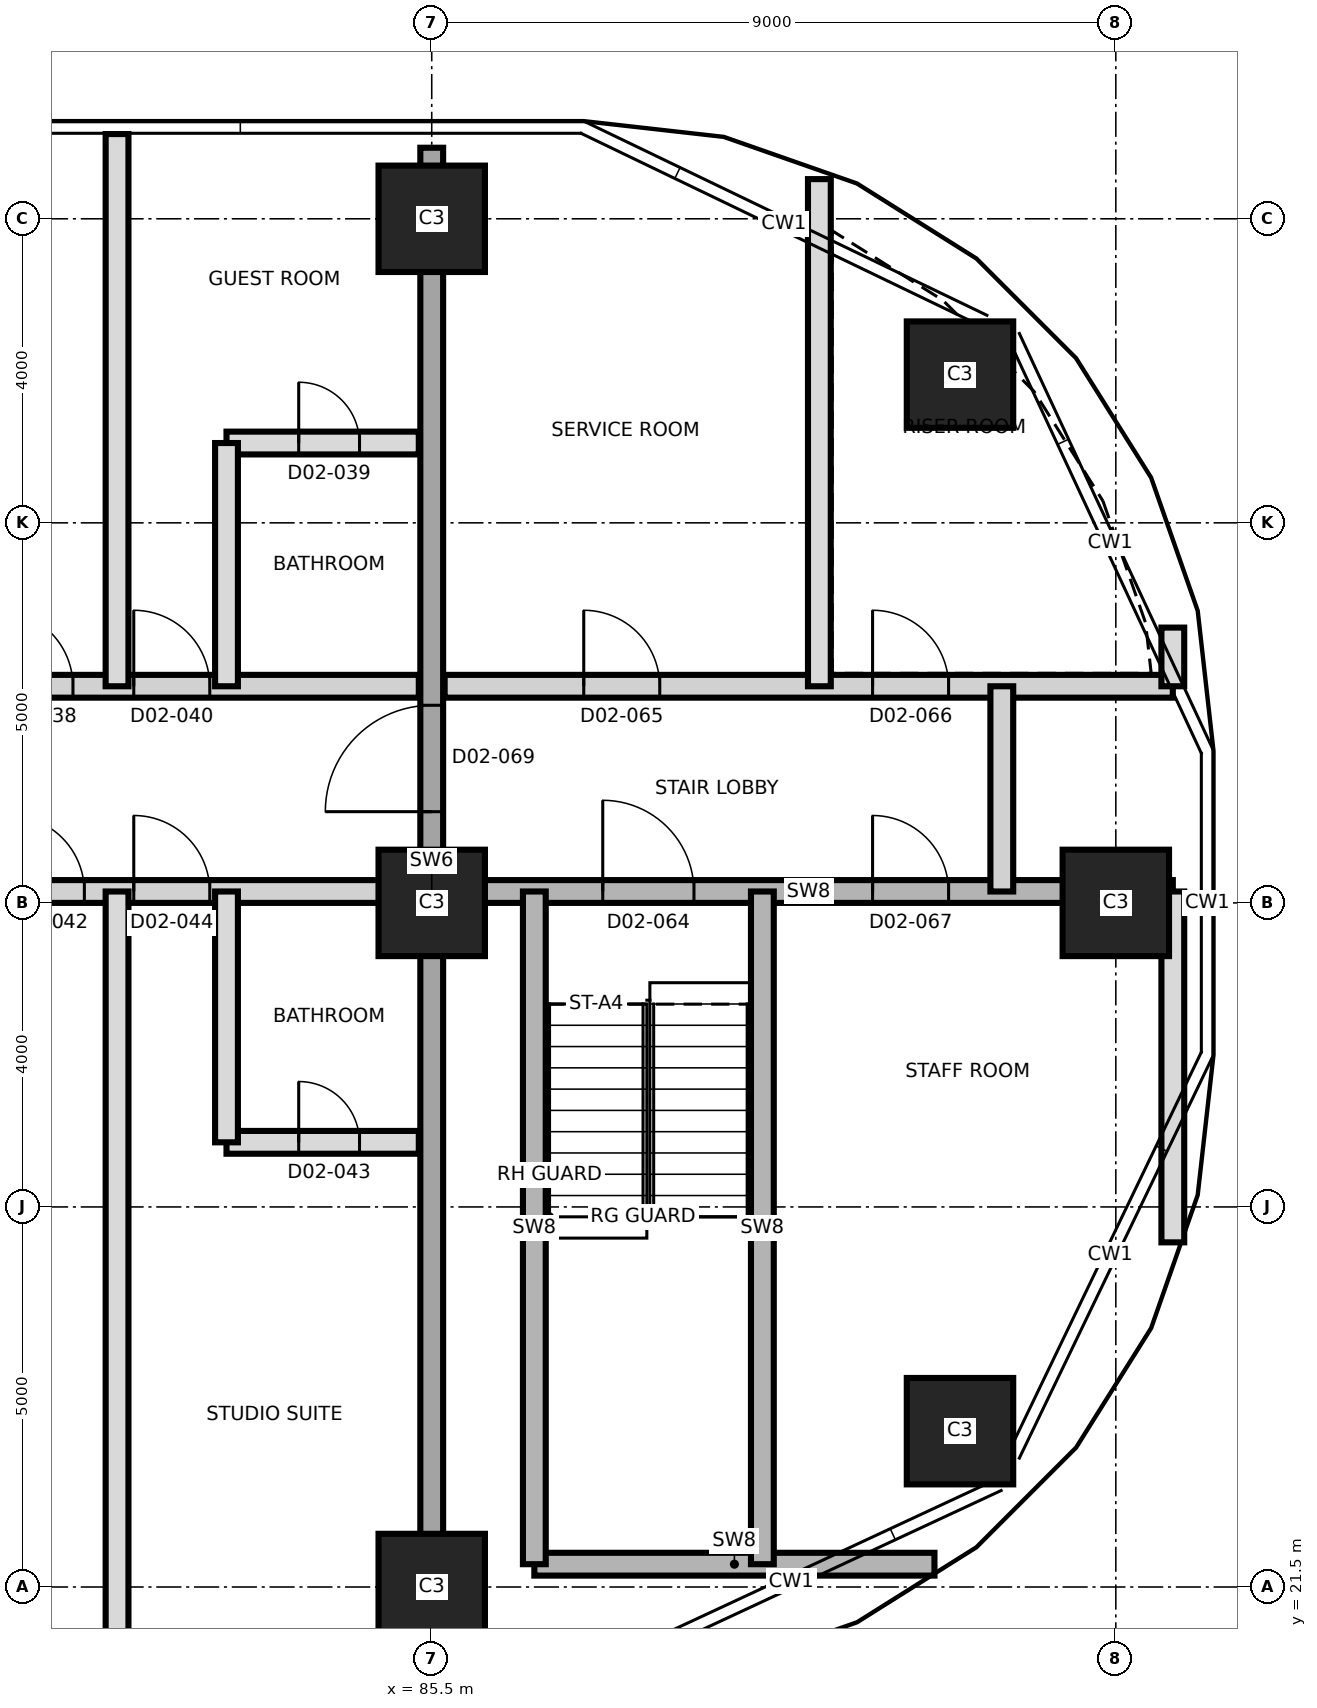
"""IFC4 building model, lengths in metres.
Left out: names, types, materials, properties, quantities, classifications, styles, units other than length and angle.
Written with IfcOpenShell. Run it as: python <this file> out.ifc"""

import sys

from ifc_helpers import new_model, si_unit, direction, frame, frame_2d, origin, origin_2d, place, context, subcontext, project, spatial, rectangle, extrude, element, fill, save


model = new_model("IFC4")
c1 = context("Model", 3, precision=1e-05, world=origin(), true_north=direction((0.0, 1.0)))
c2 = subcontext(c1, "Body", "Model", "MODEL_VIEW")
j1 = project(units=[si_unit("LENGTHUNIT", "METRE"), si_unit("PLANEANGLEUNIT", "RADIAN")], contexts=[c1])
p1 = place(None, origin())
s1 = spatial("IfcSite", under=j1, at=p1, CompositionType="ELEMENT")
p2 = place(p1, origin())
s2 = spatial("IfcBuilding", under=s1, at=p2, CompositionType="ELEMENT")
p3 = place(p2, frame((0.0, 0.0, 48.3)))
s3 = spatial("IfcBuildingStorey", under=s2, at=p3, CompositionType="ELEMENT", Elevation=48.3)
for number, where, z_axis, x_axis in (
    (1, (85.5, 21.5, 0.0), (0.0, 0.0, 1.0), (1.0, 0.0, 0.0)),
    (2, (92.45, 23.55, 0.0), (0.0, 0.0, 1.0), (1.0, 0.0, 0.0)),
    (3, (85.5, 30.5, 0.0), (0.0, 0.0, 1.0), (1.0, 0.0, 0.0)),
    (4, (94.5, 30.5, 0.0), (0.0, 0.0, 1.0), (1.0, 0.0, 0.0)),
    (5, (92.45, 37.45, 0.0), (0.0, 0.0, 1.0), (1.0, 0.0, 0.0)),
    (6, (85.5, 39.5, 0.0), (0.0, 0.0, 1.0), (1.0, 0.0, 0.0)),
):
    element("IfcColumn", number, at=place(p3, frame(where, z_axis=z_axis, x_axis=x_axis)), inside=s3, PredefinedType="COLUMN", context=c2, shape_type="SweptSolid", body=[
        extrude(rectangle(XDim=1.4, YDim=1.4, at=origin_2d()), origin(), (0.0, 0.0, 1.0), 3.7),
    ])
p4 = place(p3, frame((85.5, 20.565, 0.0), z_axis=(0.0, 0.0, 1.0), x_axis=(0.0, 1.0, 0.0)))
e7 = element("IfcWall", 7, at=p4, inside=s3, PredefinedType="SHEAR", context=c2, shape_type="SweptSolid", body=[
    extrude(rectangle(XDim=19.87, YDim=0.3, at=frame_2d((9.935, 0.0))), origin(), (0.0, 0.0, 1.0), 3.7),
])
p5 = place(p4, frame((11.135, 0.0, 0.0)))
e8 = element("IfcOpeningElement", 8, at=p5, cuts=e7, PredefinedType="OPENING", context=c2, shape_type="SweptSolid", body=[
    extrude(rectangle(XDim=1.4, YDim=2.1, at=frame_2d((0.7, 1.05))), frame((0.0, 0.16, 0.0), z_axis=(0.0, -1.0, 0.0), x_axis=(1.0, 0.0, 0.0)), (0.0, 0.0, 1.0), 0.32),
])
p6 = place(p3, frame((86.85, 21.8, 0.0), z_axis=(0.0, 0.0, 1.0), x_axis=(1.0, 0.0, 0.0)))
e9 = element("IfcWall", 9, at=p6, inside=s3, PredefinedType="SHEAR", context=c2, shape_type="SweptSolid", body=[
    extrude(rectangle(XDim=5.264, YDim=0.3, at=frame_2d((2.632, 0.0))), origin(), (0.0, 0.0, 1.0), 3.4),
])
p7 = place(p3, frame((82.8, 27.35, 0.0), z_axis=(0.0, 0.0, 1.0), x_axis=(1.0, 0.0, 0.0)))
e10 = element("IfcWall", 10, at=p7, inside=s3, PredefinedType="PARTITIONING", context=c2, shape_type="SweptSolid", body=[
    extrude(rectangle(XDim=2.53, YDim=0.3, at=frame_2d((1.265, 0.0))), origin(), (0.0, 0.0, 1.0), 3.4),
])
p8 = place(p7, frame((0.95, 0.0, 0.0)))
e11 = element("IfcOpeningElement", 11, at=p8, cuts=e10, PredefinedType="OPENING", context=c2, shape_type="SweptSolid", body=[
    extrude(rectangle(XDim=0.8, YDim=2.1, at=frame_2d((0.4, 1.05))), frame((0.0, 0.16, 0.0), z_axis=(0.0, -1.0, 0.0), x_axis=(1.0, 0.0, 0.0)), (0.0, 0.0, 1.0), 0.32),
])
p9 = place(p3, frame((58.95, 30.65, 0.0), z_axis=(0.0, 0.0, 1.0), x_axis=(1.0, 0.0, 0.0)))
e12 = element("IfcWall", 12, at=p9, inside=s3, PredefinedType="PARTITIONING", context=c2, shape_type="SweptSolid", body=[
    extrude(rectangle(XDim=26.38, YDim=0.3, at=frame_2d((13.19, 0.0))), origin(), (0.0, 0.0, 1.0), 3.4),
])
p10 = place(p9, frame((0.685, 0.0, 0.0)))
e13 = element("IfcOpeningElement", 13, at=p10, cuts=e12, PredefinedType="OPENING", context=c2, shape_type="SweptSolid", body=[
    extrude(rectangle(XDim=1.2, YDim=2.1, at=frame_2d((0.6, 1.05))), frame((0.0, 0.16, 0.0), z_axis=(0.0, -1.0, 0.0), x_axis=(1.0, 0.0, 0.0)), (0.0, 0.0, 1.0), 0.32),
])
p11 = place(p9, frame((3.935, 0.0, 0.0)))
e14 = element("IfcOpeningElement", 14, at=p11, cuts=e12, PredefinedType="OPENING", context=c2, shape_type="SweptSolid", body=[
    extrude(rectangle(XDim=1.0, YDim=2.1, at=frame_2d((0.5, 1.05))), frame((0.0, 0.16, 0.0), z_axis=(0.0, -1.0, 0.0), x_axis=(1.0, 0.0, 0.0)), (0.0, 0.0, 1.0), 0.32),
])
p12 = place(p9, frame((12.55, 0.0, 0.0)))
e15 = element("IfcOpeningElement", 15, at=p12, cuts=e12, PredefinedType="OPENING", context=c2, shape_type="SweptSolid", body=[
    extrude(rectangle(XDim=1.0, YDim=2.4, at=frame_2d((0.5, 1.2))), frame((0.0, 0.16, 0.0), z_axis=(0.0, -1.0, 0.0), x_axis=(1.0, 0.0, 0.0)), (0.0, 0.0, 1.0), 0.32),
])
p13 = place(p9, frame((20.98, 0.0, 0.0)))
e16 = element("IfcOpeningElement", 16, at=p13, cuts=e12, PredefinedType="OPENING", context=c2, shape_type="SweptSolid", body=[
    extrude(rectangle(XDim=1.0, YDim=2.4, at=frame_2d((0.5, 1.2))), frame((0.0, 0.16, 0.0), z_axis=(0.0, -1.0, 0.0), x_axis=(1.0, 0.0, 0.0)), (0.0, 0.0, 1.0), 0.32),
])
p14 = place(p9, frame((22.63, 0.0, 0.0)))
e17 = element("IfcOpeningElement", 17, at=p14, cuts=e12, PredefinedType="OPENING", context=c2, shape_type="SweptSolid", body=[
    extrude(rectangle(XDim=1.0, YDim=2.4, at=frame_2d((0.5, 1.2))), frame((0.0, 0.16, 0.0), z_axis=(0.0, -1.0, 0.0), x_axis=(1.0, 0.0, 0.0)), (0.0, 0.0, 1.0), 0.32),
])
p15 = place(p3, frame((85.67, 30.65, 0.0), z_axis=(0.0, 0.0, 1.0), x_axis=(1.0, 0.0, 0.0)))
e18 = element("IfcWall", 18, at=p15, inside=s3, PredefinedType="SHEAR", context=c2, shape_type="SweptSolid", body=[
    extrude(rectangle(XDim=9.58, YDim=0.3, at=frame_2d((4.79, 0.0))), origin(), (0.0, 0.0, 1.0), 3.4),
])
p16 = place(p15, frame((2.08, 0.0, 0.0)))
e19 = element("IfcOpeningElement", 19, at=p16, cuts=e18, PredefinedType="OPENING", context=c2, shape_type="SweptSolid", body=[
    extrude(rectangle(XDim=1.2, YDim=2.1, at=frame_2d((0.6, 1.05))), frame((0.0, 0.16, 0.0), z_axis=(0.0, -1.0, 0.0), x_axis=(1.0, 0.0, 0.0)), (0.0, 0.0, 1.0), 0.32),
])
p17 = place(p15, frame((5.63, 0.0, 0.0)))
e20 = element("IfcOpeningElement", 20, at=p17, cuts=e18, PredefinedType="OPENING", context=c2, shape_type="SweptSolid", body=[
    extrude(rectangle(XDim=1.0, YDim=2.1, at=frame_2d((0.5, 1.05))), frame((0.0, 0.16, 0.0), z_axis=(0.0, -1.0, 0.0), x_axis=(1.0, 0.0, 0.0)), (0.0, 0.0, 1.0), 0.32),
])
p18 = place(p3, frame((58.95, 33.35, 0.0), z_axis=(0.0, 0.0, 1.0), x_axis=(1.0, 0.0, 0.0)))
e21 = element("IfcWall", 21, at=p18, inside=s3, PredefinedType="PARTITIONING", context=c2, shape_type="SweptSolid", body=[
    extrude(rectangle(XDim=26.38, YDim=0.3, at=frame_2d((13.19, 0.0))), origin(), (0.0, 0.0, 1.0), 3.4),
])
p19 = place(p18, frame((2.6, 0.0, 0.0)))
e22 = element("IfcOpeningElement", 22, at=p19, cuts=e21, PredefinedType="OPENING", context=c2, shape_type="SweptSolid", body=[
    extrude(rectangle(XDim=1.0, YDim=2.1, at=frame_2d((0.5, 1.05))), frame((0.0, 0.16, 0.0), z_axis=(0.0, -1.0, 0.0), x_axis=(1.0, 0.0, 0.0)), (0.0, 0.0, 1.0), 0.32),
])
p20 = place(p18, frame((5.55, 0.0, 0.0)))
e23 = element("IfcOpeningElement", 23, at=p20, cuts=e21, PredefinedType="OPENING", context=c2, shape_type="SweptSolid", body=[
    extrude(rectangle(XDim=1.4, YDim=2.1, at=frame_2d((0.7, 1.05))), frame((0.0, 0.16, 0.0), z_axis=(0.0, -1.0, 0.0), x_axis=(1.0, 0.0, 0.0)), (0.0, 0.0, 1.0), 0.32),
])
p21 = place(p18, frame((14.2, 0.0, 0.0)))
e24 = element("IfcOpeningElement", 24, at=p21, cuts=e21, PredefinedType="OPENING", context=c2, shape_type="SweptSolid", body=[
    extrude(rectangle(XDim=1.0, YDim=2.4, at=frame_2d((0.5, 1.2))), frame((0.0, 0.16, 0.0), z_axis=(0.0, -1.0, 0.0), x_axis=(1.0, 0.0, 0.0)), (0.0, 0.0, 1.0), 0.32),
])
p22 = place(p18, frame((20.83, 0.0, 0.0)))
e25 = element("IfcOpeningElement", 25, at=p22, cuts=e21, PredefinedType="OPENING", context=c2, shape_type="SweptSolid", body=[
    extrude(rectangle(XDim=1.0, YDim=2.1, at=frame_2d((0.5, 1.05))), frame((0.0, 0.16, 0.0), z_axis=(0.0, -1.0, 0.0), x_axis=(1.0, 0.0, 0.0)), (0.0, 0.0, 1.0), 0.32),
])
p23 = place(p18, frame((22.63, 0.0, 0.0)))
e26 = element("IfcOpeningElement", 26, at=p23, cuts=e21, PredefinedType="OPENING", context=c2, shape_type="SweptSolid", body=[
    extrude(rectangle(XDim=1.0, YDim=2.1, at=frame_2d((0.5, 1.05))), frame((0.0, 0.16, 0.0), z_axis=(0.0, -1.0, 0.0), x_axis=(1.0, 0.0, 0.0)), (0.0, 0.0, 1.0), 0.32),
])
p24 = place(p3, frame((85.67, 33.35, 0.0), z_axis=(0.0, 0.0, 1.0), x_axis=(1.0, 0.0, 0.0)))
e27 = element("IfcWall", 27, at=p24, inside=s3, PredefinedType="PARTITIONING", context=c2, shape_type="SweptSolid", body=[
    extrude(rectangle(XDim=9.58, YDim=0.3, at=frame_2d((4.79, 0.0))), origin(), (0.0, 0.0, 1.0), 3.4),
])
p25 = place(p24, frame((1.83, 0.0, 0.0)))
e28 = element("IfcOpeningElement", 28, at=p25, cuts=e27, PredefinedType="OPENING", context=c2, shape_type="SweptSolid", body=[
    extrude(rectangle(XDim=1.0, YDim=2.1, at=frame_2d((0.5, 1.05))), frame((0.0, 0.16, 0.0), z_axis=(0.0, -1.0, 0.0), x_axis=(1.0, 0.0, 0.0)), (0.0, 0.0, 1.0), 0.32),
])
p26 = place(p24, frame((5.63, 0.0, 0.0)))
e29 = element("IfcOpeningElement", 29, at=p26, cuts=e27, PredefinedType="OPENING", context=c2, shape_type="SweptSolid", body=[
    extrude(rectangle(XDim=1.0, YDim=2.1, at=frame_2d((0.5, 1.05))), frame((0.0, 0.16, 0.0), z_axis=(0.0, -1.0, 0.0), x_axis=(1.0, 0.0, 0.0)), (0.0, 0.0, 1.0), 0.32),
])
p27 = place(p3, frame((82.8, 36.55, 0.0), z_axis=(0.0, 0.0, 1.0), x_axis=(1.0, 0.0, 0.0)))
e30 = element("IfcWall", 30, at=p27, inside=s3, PredefinedType="PARTITIONING", context=c2, shape_type="SweptSolid", body=[
    extrude(rectangle(XDim=2.53, YDim=0.3, at=frame_2d((1.265, 0.0))), origin(), (0.0, 0.0, 1.0), 3.4),
])
p28 = place(p27, frame((0.95, 0.0, 0.0)))
e31 = element("IfcOpeningElement", 31, at=p28, cuts=e30, PredefinedType="OPENING", context=c2, shape_type="SweptSolid", body=[
    extrude(rectangle(XDim=0.8, YDim=2.1, at=frame_2d((0.4, 1.05))), frame((0.0, 0.16, 0.0), z_axis=(0.0, -1.0, 0.0), x_axis=(1.0, 0.0, 0.0)), (0.0, 0.0, 1.0), 0.32),
])
p29 = place(p3, frame((81.36, 20.565, 0.0), z_axis=(0.0, 0.0, 1.0), x_axis=(0.0, 1.0, 0.0)))
e32 = element("IfcWall", 32, at=p29, inside=s3, PredefinedType="PARTITIONING", context=c2, shape_type="SweptSolid", body=[
    extrude(rectangle(XDim=10.085, YDim=0.3, at=frame_2d((5.042, 0.0))), origin(), (0.0, 0.0, 1.0), 3.4),
])
p30 = place(p3, frame((81.36, 33.35, 0.0), z_axis=(0.0, 0.0, 1.0), x_axis=(0.0, 1.0, 0.0)))
e33 = element("IfcWall", 33, at=p30, inside=s3, PredefinedType="PARTITIONING", context=c2, shape_type="SweptSolid", body=[
    extrude(rectangle(XDim=7.265, YDim=0.3, at=frame_2d((3.632, 0.0))), origin(), (0.0, 0.0, 1.0), 3.4),
])
p31 = place(p3, frame((82.8, 27.35, 0.0), z_axis=(0.0, 0.0, 1.0), x_axis=(0.0, 1.0, 0.0)))
e34 = element("IfcWall", 34, at=p31, inside=s3, PredefinedType="PARTITIONING", context=c2, shape_type="SweptSolid", body=[
    extrude(rectangle(XDim=3.3, YDim=0.3, at=frame_2d((1.65, 0.0))), origin(), (0.0, 0.0, 1.0), 3.4),
])
p32 = place(p3, frame((82.8, 33.35, 0.0), z_axis=(0.0, 0.0, 1.0), x_axis=(0.0, 1.0, 0.0)))
e35 = element("IfcWall", 35, at=p32, inside=s3, PredefinedType="PARTITIONING", context=c2, shape_type="SweptSolid", body=[
    extrude(rectangle(XDim=3.2, YDim=0.3, at=frame_2d((1.6, 0.0))), origin(), (0.0, 0.0, 1.0), 3.4),
])
for number, where, z_axis, x_axis in (
    (36, (86.85, 21.8, 0.0), (0.0, 0.0, 1.0), (0.0, 1.0, 0.0)),
    (37, (89.85, 21.8, 0.0), (0.0, 0.0, 1.0), (0.0, 1.0, 0.0)),
):
    element("IfcWall", number, at=place(p3, frame(where, z_axis=z_axis, x_axis=x_axis)), inside=s3, PredefinedType="SHEAR", context=c2, shape_type="SweptSolid", body=[
        extrude(rectangle(XDim=8.85, YDim=0.3, at=frame_2d((4.425, 0.0))), origin(), (0.0, 0.0, 1.0), 3.4),
    ])
p33 = place(p3, frame((90.6, 33.35, 0.0), z_axis=(0.0, 0.0, 1.0), x_axis=(0.0, 1.0, 0.0)))
e38 = element("IfcWall", 38, at=p33, inside=s3, PredefinedType="PARTITIONING", context=c2, shape_type="SweptSolid", body=[
    extrude(rectangle(XDim=6.672, YDim=0.3, at=frame_2d((3.336, 0.0))), origin(), (0.0, 0.0, 1.0), 3.4),
])
p34 = place(p3, frame((93.0, 30.65, 0.0), z_axis=(0.0, 0.0, 1.0), x_axis=(0.0, 1.0, 0.0)))
e39 = element("IfcWall", 39, at=p34, inside=s3, PredefinedType="PARTITIONING", context=c2, shape_type="SweptSolid", body=[
    extrude(rectangle(XDim=2.7, YDim=0.3, at=frame_2d((1.35, 0.0))), origin(), (0.0, 0.0, 1.0), 3.4),
])
p35 = place(p3, frame((95.25, 26.034, 0.0), z_axis=(0.0, 0.0, 1.0), x_axis=(0.0, 1.0, 0.0)))
e40 = element("IfcWall", 40, at=p35, inside=s3, PredefinedType="PARTITIONING", context=c2, shape_type="SweptSolid", body=[
    extrude(rectangle(XDim=4.616, YDim=0.3, at=frame_2d((2.308, 0.0))), origin(), (0.0, 0.0, 1.0), 3.4),
])
p36 = place(p3, frame((95.25, 33.35, 0.0), z_axis=(0.0, 0.0, 1.0), x_axis=(0.0, 1.0, 0.0)))
e41 = element("IfcWall", 41, at=p36, inside=s3, PredefinedType="PARTITIONING", context=c2, shape_type="SweptSolid", body=[
    extrude(rectangle(XDim=0.772, YDim=0.3, at=frame_2d((0.386, 0.0))), origin(), (0.0, 0.0, 1.0), 3.4),
])
p37 = place(p22, origin())
e42 = element("IfcDoor", 42, at=p37, inside=s3, OperationType="SINGLE_SWING_RIGHT", PredefinedType="DOOR", context=c2, shape_type="SweptSolid", body=[
    extrude(rectangle(XDim=1.0, YDim=2.1, at=frame_2d((0.5, 1.05))), frame((0.0, 0.025, 0.0), z_axis=(0.0, -1.0, 0.0), x_axis=(1.0, 0.0, 0.0)), (0.0, 0.0, 1.0), 0.05),
])
fill(e25, e42)
p38 = place(p28, origin())
e43 = element("IfcDoor", 43, at=p38, inside=s3, OperationType="SINGLE_SWING_RIGHT", PredefinedType="DOOR", context=c2, shape_type="SweptSolid", body=[
    extrude(rectangle(XDim=0.8, YDim=2.1, at=frame_2d((0.4, 1.05))), frame((0.0, 0.025, 0.0), z_axis=(0.0, -1.0, 0.0), x_axis=(1.0, 0.0, 0.0)), (0.0, 0.0, 1.0), 0.05),
])
fill(e31, e43)
p39 = place(p23, origin())
e44 = element("IfcDoor", 44, at=p39, inside=s3, OperationType="SINGLE_SWING_LEFT", PredefinedType="DOOR", context=c2, shape_type="SweptSolid", body=[
    extrude(rectangle(XDim=1.0, YDim=2.1, at=frame_2d((0.5, 1.05))), frame((0.0, 0.025, 0.0), z_axis=(0.0, -1.0, 0.0), x_axis=(1.0, 0.0, 0.0)), (0.0, 0.0, 1.0), 0.05),
])
fill(e26, e44)
p40 = place(p13, origin())
e45 = element("IfcDoor", 45, at=p40, inside=s3, OperationType="SINGLE_SWING_LEFT", PredefinedType="DOOR", context=c2, shape_type="SweptSolid", body=[
    extrude(rectangle(XDim=1.0, YDim=2.4, at=frame_2d((0.5, 1.2))), frame((0.0, 0.025, 0.0), z_axis=(0.0, -1.0, 0.0), x_axis=(1.0, 0.0, 0.0)), (0.0, 0.0, 1.0), 0.05),
])
fill(e16, e45)
p41 = place(p8, origin())
e46 = element("IfcDoor", 46, at=p41, inside=s3, OperationType="SINGLE_SWING_LEFT", PredefinedType="DOOR", context=c2, shape_type="SweptSolid", body=[
    extrude(rectangle(XDim=0.8, YDim=2.1, at=frame_2d((0.4, 1.05))), frame((0.0, 0.025, 0.0), z_axis=(0.0, -1.0, 0.0), x_axis=(1.0, 0.0, 0.0)), (0.0, 0.0, 1.0), 0.05),
])
fill(e11, e46)
p42 = place(p14, origin())
e47 = element("IfcDoor", 47, at=p42, inside=s3, OperationType="SINGLE_SWING_RIGHT", PredefinedType="DOOR", context=c2, shape_type="SweptSolid", body=[
    extrude(rectangle(XDim=1.0, YDim=2.4, at=frame_2d((0.5, 1.2))), frame((0.0, 0.025, 0.0), z_axis=(0.0, -1.0, 0.0), x_axis=(1.0, 0.0, 0.0)), (0.0, 0.0, 1.0), 0.05),
])
fill(e17, e47)
p43 = place(p16, origin())
e48 = element("IfcDoor", 48, at=p43, inside=s3, OperationType="SINGLE_SWING_LEFT", PredefinedType="DOOR", context=c2, shape_type="SweptSolid", body=[
    extrude(rectangle(XDim=1.2, YDim=2.1, at=frame_2d((0.6, 1.05))), frame((0.0, 0.025, 0.0), z_axis=(0.0, -1.0, 0.0), x_axis=(1.0, 0.0, 0.0)), (0.0, 0.0, 1.0), 0.05),
])
fill(e19, e48)
p44 = place(p25, origin())
e49 = element("IfcDoor", 49, at=p44, inside=s3, OperationType="SINGLE_SWING_LEFT", PredefinedType="DOOR", context=c2, shape_type="SweptSolid", body=[
    extrude(rectangle(XDim=1.0, YDim=2.1, at=frame_2d((0.5, 1.05))), frame((0.0, 0.025, 0.0), z_axis=(0.0, -1.0, 0.0), x_axis=(1.0, 0.0, 0.0)), (0.0, 0.0, 1.0), 0.05),
])
fill(e28, e49)
p45 = place(p26, origin())
e50 = element("IfcDoor", 50, at=p45, inside=s3, OperationType="SINGLE_SWING_RIGHT", PredefinedType="DOOR", context=c2, shape_type="SweptSolid", body=[
    extrude(rectangle(XDim=1.0, YDim=2.1, at=frame_2d((0.5, 1.05))), frame((0.0, 0.025, 0.0), z_axis=(0.0, -1.0, 0.0), x_axis=(1.0, 0.0, 0.0)), (0.0, 0.0, 1.0), 0.05),
])
fill(e29, e50)
p46 = place(p17, origin())
e51 = element("IfcDoor", 51, at=p46, inside=s3, OperationType="SINGLE_SWING_LEFT", PredefinedType="DOOR", context=c2, shape_type="SweptSolid", body=[
    extrude(rectangle(XDim=1.0, YDim=2.1, at=frame_2d((0.5, 1.05))), frame((0.0, 0.025, 0.0), z_axis=(0.0, -1.0, 0.0), x_axis=(1.0, 0.0, 0.0)), (0.0, 0.0, 1.0), 0.05),
])
fill(e20, e51)
p47 = place(p5, origin())
e52 = element("IfcDoor", 52, at=p47, inside=s3, OperationType="SINGLE_SWING_RIGHT", PredefinedType="DOOR", context=c2, shape_type="SweptSolid", body=[
    extrude(rectangle(XDim=1.4, YDim=2.1, at=frame_2d((0.7, 1.05))), frame((0.0, 0.025, 0.0), z_axis=(0.0, -1.0, 0.0), x_axis=(1.0, 0.0, 0.0)), (0.0, 0.0, 1.0), 0.05),
])
fill(e8, e52)
save(model, sys.argv[1])
